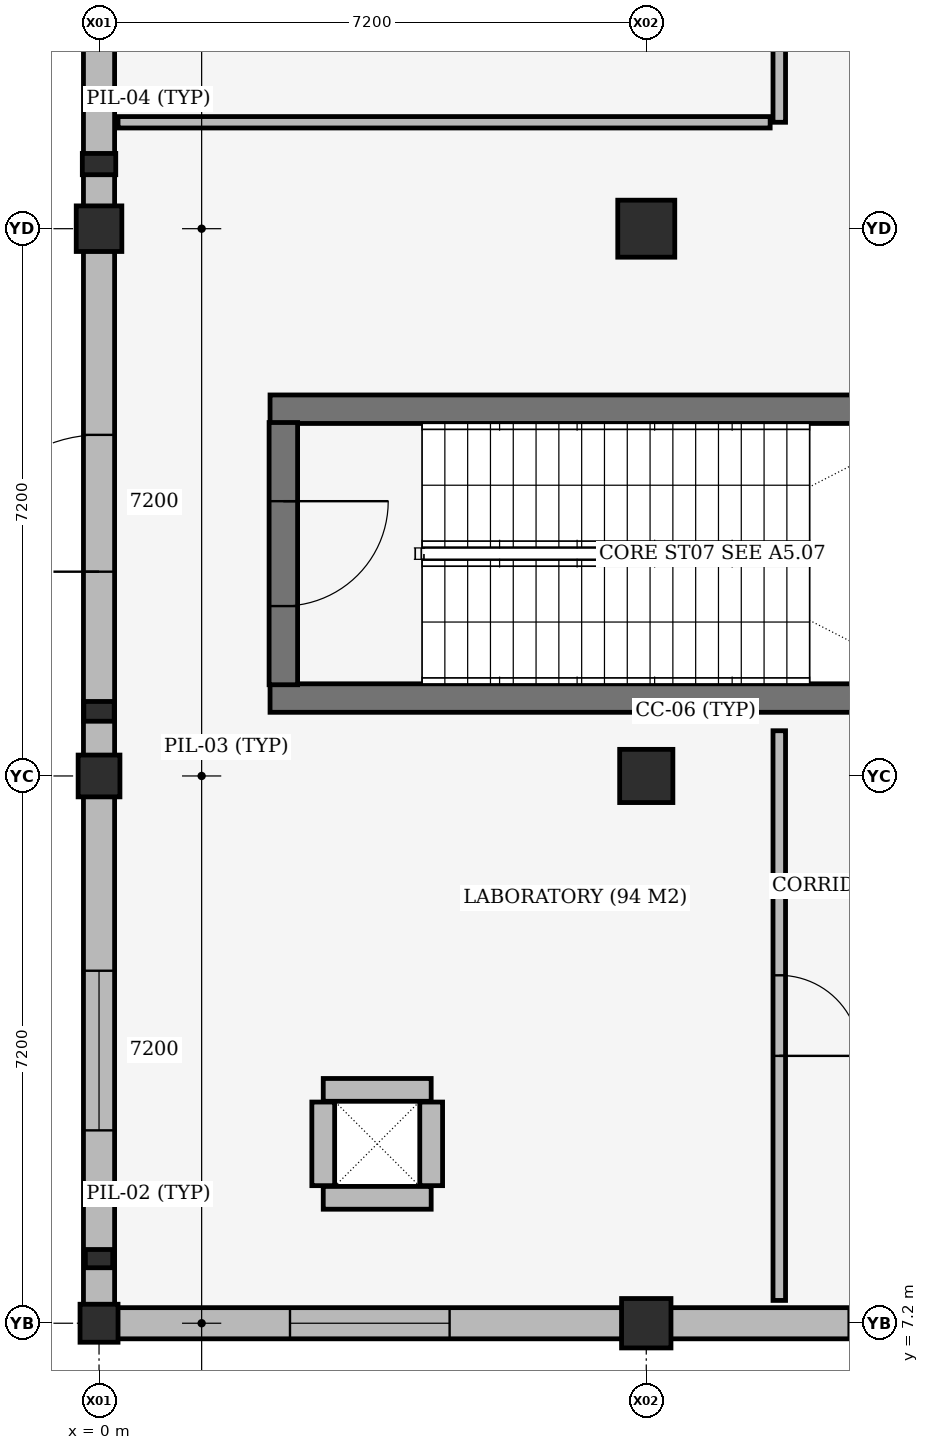
"""IFC4 building model, lengths in metres.
Left out: names, types, materials, properties, quantities, classifications, styles, units other than length and angle.
Written with IfcOpenShell. Run it as: python <this file> out.ifc"""

import sys

from ifc_helpers import new_model, si_unit, direction, frame, frame_2d, origin, origin_2d, place, context, subcontext, project, spatial, rectangle, extrude, element, fill, save


model = new_model("IFC4")
c1 = context("Model", 3, precision=1e-05, world=origin(), true_north=direction((0.0, 1.0)))
c2 = subcontext(c1, "Body", "Model", "MODEL_VIEW")
j1 = project(units=[si_unit("LENGTHUNIT", "METRE"), si_unit("PLANEANGLEUNIT", "RADIAN")], contexts=[c1])
p1 = place(None, origin())
s1 = spatial("IfcSite", under=j1, at=p1, CompositionType="ELEMENT")
p2 = place(p1, origin())
s2 = spatial("IfcBuilding", under=s1, at=p2, CompositionType="ELEMENT")
p3 = place(p2, origin())
s3 = spatial("IfcBuildingStorey", under=s2, at=p3, CompositionType="ELEMENT", Elevation=0.0)
p4 = place(p3, frame((2.95, 8.85, 0.0), z_axis=(0.0, 0.0, 1.0), x_axis=(1.0, 0.0, 0.0)))
e1 = element("IfcWall", 1, at=p4, inside=s3, PredefinedType="SHEAR", context=c2, shape_type="SweptSolid", body=[
    extrude(rectangle(XDim=1.42, YDim=0.3, at=frame_2d((0.71, 0.0))), origin(), (0.0, 0.0, 1.0), 5.16),
])
p5 = place(p3, frame((4.37, 9.01, 0.0), z_axis=(0.0, 0.0, 1.0), x_axis=(0.0, 1.0, 0.0)))
e2 = element("IfcWall", 2, at=p5, inside=s3, PredefinedType="SHEAR", context=c2, shape_type="SweptSolid", body=[
    extrude(rectangle(XDim=1.1, YDim=0.3, at=frame_2d((0.55, 0.0))), origin(), (0.0, 0.0, 1.0), 5.16),
])
p6 = place(p3, frame((4.37, 10.27, 0.0), z_axis=(0.0, 0.0, 1.0), x_axis=(-1.0, 0.0, 0.0)))
e3 = element("IfcWall", 3, at=p6, inside=s3, PredefinedType="SHEAR", context=c2, shape_type="SweptSolid", body=[
    extrude(rectangle(XDim=1.42, YDim=0.3, at=frame_2d((0.71, 0.0))), origin(), (0.0, 0.0, 1.0), 5.16),
])
p7 = place(p3, frame((2.95, 10.11, 0.0), z_axis=(0.0, 0.0, 1.0), x_axis=(0.0, -1.0, 0.0)))
e4 = element("IfcWall", 4, at=p7, inside=s3, PredefinedType="SHEAR", context=c2, shape_type="SweptSolid", body=[
    extrude(rectangle(XDim=1.1, YDim=0.3, at=frame_2d((0.55, 0.0))), origin(), (0.0, 0.0, 1.0), 5.16),
])
p8 = place(p3, frame((0.0, 7.2, 0.0), z_axis=(0.0, 0.0, 1.0), x_axis=(1.0, 0.0, 0.0)))
e5 = element("IfcColumn", 5, at=p8, inside=s3, PredefinedType="COLUMN", context=c2, shape_type="SweptSolid", body=[
    extrude(rectangle(XDim=0.5, YDim=0.5, at=origin_2d()), origin(), (0.0, 0.0, 1.0), 5.1),
])
p9 = place(p3, frame((0.0, 14.4, 0.0), z_axis=(0.0, 0.0, 1.0), x_axis=(1.0, 0.0, 0.0)))
e6 = element("IfcColumn", 6, at=p9, inside=s3, PredefinedType="COLUMN", context=c2, shape_type="SweptSolid", body=[
    extrude(rectangle(XDim=0.55, YDim=0.55, at=origin_2d()), origin(), (0.0, 0.0, 1.0), 5.1),
])
p10 = place(p3, frame((0.0, 21.6, 0.0), z_axis=(0.0, 0.0, 1.0), x_axis=(1.0, 0.0, 0.0)))
e7 = element("IfcColumn", 7, at=p10, inside=s3, PredefinedType="COLUMN", context=c2, shape_type="SweptSolid", body=[
    extrude(rectangle(XDim=0.6, YDim=0.6, at=origin_2d()), origin(), (0.0, 0.0, 1.0), 5.1),
])
p11 = place(p3, frame((7.2, 7.2, 0.0), z_axis=(0.0, 0.0, 1.0), x_axis=(1.0, 0.0, 0.0)))
e8 = element("IfcColumn", 8, at=p11, inside=s3, PredefinedType="COLUMN", context=c2, shape_type="SweptSolid", body=[
    extrude(rectangle(XDim=0.65, YDim=0.65, at=origin_2d()), origin(), (0.0, 0.0, 1.0), 5.1),
])
p12 = place(p3, frame((7.2, 14.4, 0.0), z_axis=(0.0, 0.0, 1.0), x_axis=(1.0, 0.0, 0.0)))
e9 = element("IfcColumn", 9, at=p12, inside=s3, PredefinedType="COLUMN", context=c2, shape_type="SweptSolid", body=[
    extrude(rectangle(XDim=0.7, YDim=0.7, at=origin_2d()), origin(), (0.0, 0.0, 1.0), 5.1),
])
p13 = place(p3, frame((7.2, 21.6, 0.0), z_axis=(0.0, 0.0, 1.0), x_axis=(1.0, 0.0, 0.0)))
e10 = element("IfcColumn", 10, at=p13, inside=s3, PredefinedType="COLUMN", context=c2, shape_type="SweptSolid", body=[
    extrude(rectangle(XDim=0.75, YDim=0.75, at=origin_2d()), origin(), (0.0, 0.0, 1.0), 5.1),
])
p14 = place(p3, frame((0.0, 8.05, 0.0), z_axis=(0.0, 0.0, 1.0), x_axis=(1.0, 0.0, 0.0)))
e11 = element("IfcColumn", 11, at=p14, inside=s3, PredefinedType="PILASTER", context=c2, shape_type="SweptSolid", body=[
    extrude(rectangle(XDim=0.36, YDim=0.24, at=origin_2d()), origin(), (0.0, 0.0, 1.0), 5.1),
])
p15 = place(p3, frame((0.0, 15.25, 0.0), z_axis=(0.0, 0.0, 1.0), x_axis=(1.0, 0.0, 0.0)))
e12 = element("IfcColumn", 12, at=p15, inside=s3, PredefinedType="PILASTER", context=c2, shape_type="SweptSolid", body=[
    extrude(rectangle(XDim=0.4, YDim=0.26, at=origin_2d()), origin(), (0.0, 0.0, 1.0), 5.1),
])
p16 = place(p3, frame((0.0, 22.45, 0.0), z_axis=(0.0, 0.0, 1.0), x_axis=(1.0, 0.0, 0.0)))
e13 = element("IfcColumn", 13, at=p16, inside=s3, PredefinedType="PILASTER", context=c2, shape_type="SweptSolid", body=[
    extrude(rectangle(XDim=0.44, YDim=0.28, at=origin_2d()), origin(), (0.0, 0.0, 1.0), 5.1),
])
for number, where, z_axis, x_axis in (
    (14, (2.25, 15.425, 0.0), (0.0, 0.0, 1.0), (1.0, 0.0, 0.0)),
    (15, (11.35, 19.225, 0.0), (0.0, 0.0, 1.0), (-1.0, 0.0, 0.0)),
):
    element("IfcWall", number, at=place(p3, frame(where, z_axis=z_axis, x_axis=x_axis)), inside=s3, PredefinedType="SHEAR", context=c2, shape_type="SweptSolid", body=[
        extrude(rectangle(XDim=9.1, YDim=0.375, at=frame_2d((4.55, 0.0))), origin(), (0.0, 0.0, 1.0), 5.1),
    ])
p17 = place(p3, frame((6.883, 7.2, 0.0), z_axis=(0.0, 0.0, 1.0), x_axis=(-1.0, 0.0, 0.0)))
e16 = element("IfcWall", 16, at=p17, inside=s3, PredefinedType="STANDARD", context=c2, shape_type="SweptSolid", body=[
    extrude(rectangle(XDim=6.641, YDim=0.41, at=frame_2d((3.321, 0.0))), origin(), (0.0, 0.0, 1.0), 4.35),
])
p18 = place(p17, frame((2.271, 0.0, 0.8)))
e17 = element("IfcOpeningElement", 17, at=p18, cuts=e16, PredefinedType="OPENING", context=c2, shape_type="SweptSolid", body=[
    extrude(rectangle(XDim=2.1, YDim=3.0, at=frame_2d((1.05, 1.5))), frame((0.0, 0.215, 0.0), z_axis=(0.0, -1.0, 0.0), x_axis=(1.0, 0.0, 0.0)), (0.0, 0.0, 1.0), 0.43),
])
p19 = place(p3, frame((14.008, 7.2, 0.0), z_axis=(0.0, 0.0, 1.0), x_axis=(-1.0, 0.0, 0.0)))
e18 = element("IfcWall", 18, at=p19, inside=s3, PredefinedType="STANDARD", context=c2, shape_type="SweptSolid", body=[
    extrude(rectangle(XDim=6.491, YDim=0.41, at=frame_2d((3.246, 0.0))), origin(), (0.0, 0.0, 1.0), 4.3),
])
p20 = place(p19, frame((2.345, 0.0, 0.0)))
e19 = element("IfcOpeningElement", 19, at=p20, cuts=e18, PredefinedType="OPENING", context=c2, shape_type="SweptSolid", body=[
    extrude(rectangle(XDim=1.8, YDim=2.2, at=frame_2d((0.9, 1.1))), frame((0.0, 0.215, 0.0), z_axis=(0.0, -1.0, 0.0), x_axis=(1.0, 0.0, 0.0)), (0.0, 0.0, 1.0), 0.43),
])
p21 = place(p3, frame((0.0, 7.442, 0.0), z_axis=(0.0, 0.0, 1.0), x_axis=(0.0, 1.0, 0.0)))
e20 = element("IfcWall", 20, at=p21, inside=s3, PredefinedType="STANDARD", context=c2, shape_type="SweptSolid", body=[
    extrude(rectangle(XDim=6.691, YDim=0.41, at=frame_2d((3.346, 0.0))), origin(), (0.0, 0.0, 1.0), 4.35),
])
p22 = place(p21, frame((2.295, 0.0, 0.8)))
e21 = element("IfcOpeningElement", 21, at=p22, cuts=e20, PredefinedType="OPENING", context=c2, shape_type="SweptSolid", body=[
    extrude(rectangle(XDim=2.1, YDim=3.0, at=frame_2d((1.05, 1.5))), frame((0.0, 0.215, 0.0), z_axis=(0.0, -1.0, 0.0), x_axis=(1.0, 0.0, 0.0)), (0.0, 0.0, 1.0), 0.43),
])
p23 = place(p3, frame((0.0, 14.667, 0.0), z_axis=(0.0, 0.0, 1.0), x_axis=(0.0, 1.0, 0.0)))
e22 = element("IfcWall", 22, at=p23, inside=s3, PredefinedType="STANDARD", context=c2, shape_type="SweptSolid", body=[
    extrude(rectangle(XDim=6.641, YDim=0.41, at=frame_2d((3.321, 0.0))), origin(), (0.0, 0.0, 1.0), 4.45),
])
p24 = place(p23, frame((2.42, 0.0, 0.0)))
e23 = element("IfcOpeningElement", 23, at=p24, cuts=e22, PredefinedType="OPENING", context=c2, shape_type="SweptSolid", body=[
    extrude(rectangle(XDim=1.8, YDim=2.2, at=frame_2d((0.9, 1.1))), frame((0.0, 0.215, 0.0), z_axis=(0.0, -1.0, 0.0), x_axis=(1.0, 0.0, 0.0)), (0.0, 0.0, 1.0), 0.43),
])
p25 = place(p3, frame((0.0, 21.892, 0.0), z_axis=(0.0, 0.0, 1.0), x_axis=(0.0, 1.0, 0.0)))
e24 = element("IfcWall", 24, at=p25, inside=s3, PredefinedType="STANDARD", context=c2, shape_type="SweptSolid", body=[
    extrude(rectangle(XDim=6.591, YDim=0.41, at=frame_2d((3.295, 0.0))), origin(), (0.0, 0.0, 1.0), 4.4),
])
p26 = place(p25, frame((2.246, 0.0, 0.8)))
e25 = element("IfcOpeningElement", 25, at=p26, cuts=e24, PredefinedType="OPENING", context=c2, shape_type="SweptSolid", body=[
    extrude(rectangle(XDim=2.1, YDim=3.0, at=frame_2d((1.05, 1.5))), frame((0.0, 0.215, 0.0), z_axis=(0.0, -1.0, 0.0), x_axis=(1.0, 0.0, 0.0)), (0.0, 0.0, 1.0), 0.43),
])
p27 = place(p3, frame((2.425, 19.05, 0.0), z_axis=(0.0, 0.0, 1.0), x_axis=(0.0, -1.0, 0.0)))
e26 = element("IfcWall", 26, at=p27, inside=s3, PredefinedType="SHEAR", context=c2, shape_type="SweptSolid", body=[
    extrude(rectangle(XDim=3.45, YDim=0.375, at=frame_2d((1.725, 0.0))), origin(), (0.0, 0.0, 1.0), 5.1),
])
p28 = place(p27, frame((1.035, 0.0, 0.0)))
e27 = element("IfcOpeningElement", 27, at=p28, cuts=e26, PredefinedType="OPENING", context=c2, shape_type="SweptSolid", body=[
    extrude(rectangle(XDim=1.38, YDim=2.2, at=frame_2d((0.69, 1.1))), frame((0.0, 0.198, 0.0), z_axis=(0.0, -1.0, 0.0), x_axis=(1.0, 0.0, 0.0)), (0.0, 0.0, 1.0), 0.395),
])
p29 = place(p3, frame((8.95, 7.5, 0.0), z_axis=(0.0, 0.0, 1.0), x_axis=(0.0, 1.0, 0.0)))
e28 = element("IfcWall", 28, at=p29, inside=s3, PredefinedType="PARTITIONING", context=c2, shape_type="SweptSolid", body=[
    extrude(rectangle(XDim=7.495, YDim=0.165, at=frame_2d((3.748, 0.0))), origin(), (0.0, 0.0, 1.0), 4.5),
])
p30 = place(p29, frame((3.218, 0.0, 0.0)))
e29 = element("IfcOpeningElement", 29, at=p30, cuts=e28, PredefinedType="OPENING", context=c2, shape_type="SweptSolid", body=[
    extrude(rectangle(XDim=1.06, YDim=2.2, at=frame_2d((0.53, 1.1))), frame((0.0, 0.093, 0.0), z_axis=(0.0, -1.0, 0.0), x_axis=(1.0, 0.0, 0.0)), (0.0, 0.0, 1.0), 0.185),
])
p31 = place(p3, frame((0.25, 23.0, 0.0), z_axis=(0.0, 0.0, 1.0), x_axis=(1.0, 0.0, 0.0)))
e30 = element("IfcWall", 30, at=p31, inside=s3, PredefinedType="PARTITIONING", context=c2, shape_type="SweptSolid", body=[
    extrude(rectangle(XDim=8.58, YDim=0.15, at=frame_2d((4.29, 0.0))), origin(), (0.0, 0.0, 1.0), 4.35),
])
p32 = place(p3, frame((8.95, 23.0, 0.0), z_axis=(0.0, 0.0, 1.0), x_axis=(0.0, 1.0, 0.0)))
e31 = element("IfcWall", 31, at=p32, inside=s3, PredefinedType="PARTITIONING", context=c2, shape_type="SweptSolid", body=[
    extrude(rectangle(XDim=10.195, YDim=0.165, at=frame_2d((5.098, 0.0))), origin(), (0.0, 0.0, 1.0), 4.4),
])
p33 = place(p32, frame((4.573, 0.0, 0.0)))
e32 = element("IfcOpeningElement", 32, at=p33, cuts=e31, PredefinedType="OPENING", context=c2, shape_type="SweptSolid", body=[
    extrude(rectangle(XDim=1.05, YDim=2.2, at=frame_2d((0.525, 1.1))), frame((0.0, 0.093, 0.0), z_axis=(0.0, -1.0, 0.0), x_axis=(1.0, 0.0, 0.0)), (0.0, 0.0, 1.0), 0.185),
])
p34 = place(p18, origin())
e33 = element("IfcWindow", 33, at=p34, inside=s3, PartitioningType="DOUBLE_PANEL_VERTICAL", PredefinedType="WINDOW", context=c2, shape_type="SweptSolid", body=[
    extrude(rectangle(XDim=2.1, YDim=3.0, at=frame_2d((1.05, 1.5))), frame((0.0, 0.03, 0.0), z_axis=(0.0, -1.0, 0.0), x_axis=(1.0, 0.0, 0.0)), (0.0, 0.0, 1.0), 0.06),
])
fill(e17, e33)
p35 = place(p20, origin())
e34 = element("IfcDoor", 34, at=p35, inside=s3, OperationType="DOUBLE_DOOR_SINGLE_SWING", PredefinedType="DOOR", context=c2, shape_type="SweptSolid", body=[
    extrude(rectangle(XDim=1.8, YDim=2.2, at=frame_2d((0.9, 1.1))), frame((0.0, 0.025, 0.0), z_axis=(0.0, -1.0, 0.0), x_axis=(1.0, 0.0, 0.0)), (0.0, 0.0, 1.0), 0.05),
])
fill(e19, e34)
p36 = place(p22, origin())
e35 = element("IfcWindow", 35, at=p36, inside=s3, PartitioningType="DOUBLE_PANEL_VERTICAL", PredefinedType="WINDOW", context=c2, shape_type="SweptSolid", body=[
    extrude(rectangle(XDim=2.1, YDim=3.0, at=frame_2d((1.05, 1.5))), frame((0.0, 0.03, 0.0), z_axis=(0.0, -1.0, 0.0), x_axis=(1.0, 0.0, 0.0)), (0.0, 0.0, 1.0), 0.06),
])
fill(e21, e35)
p37 = place(p24, origin())
e36 = element("IfcDoor", 36, at=p37, inside=s3, OperationType="DOUBLE_DOOR_SINGLE_SWING", PredefinedType="DOOR", context=c2, shape_type="SweptSolid", body=[
    extrude(rectangle(XDim=1.8, YDim=2.2, at=frame_2d((0.9, 1.1))), frame((0.0, 0.025, 0.0), z_axis=(0.0, -1.0, 0.0), x_axis=(1.0, 0.0, 0.0)), (0.0, 0.0, 1.0), 0.05),
])
fill(e23, e36)
p38 = place(p28, origin())
e37 = element("IfcDoor", 37, at=p38, inside=s3, OperationType="DOUBLE_DOOR_SINGLE_SWING", PredefinedType="DOOR", context=c2, shape_type="SweptSolid", body=[
    extrude(rectangle(XDim=1.38, YDim=2.2, at=frame_2d((0.69, 1.1))), frame((0.0, 0.025, 0.0), z_axis=(0.0, -1.0, 0.0), x_axis=(1.0, 0.0, 0.0)), (0.0, 0.0, 1.0), 0.05),
])
fill(e27, e37)
p39 = place(p30, origin())
e38 = element("IfcDoor", 38, at=p39, inside=s3, OperationType="SINGLE_SWING_RIGHT", PredefinedType="DOOR", context=c2, shape_type="SweptSolid", body=[
    extrude(rectangle(XDim=1.06, YDim=2.2, at=frame_2d((0.53, 1.1))), frame((0.0, 0.025, 0.0), z_axis=(0.0, -1.0, 0.0), x_axis=(1.0, 0.0, 0.0)), (0.0, 0.0, 1.0), 0.05),
])
fill(e29, e38)
save(model, sys.argv[1])
